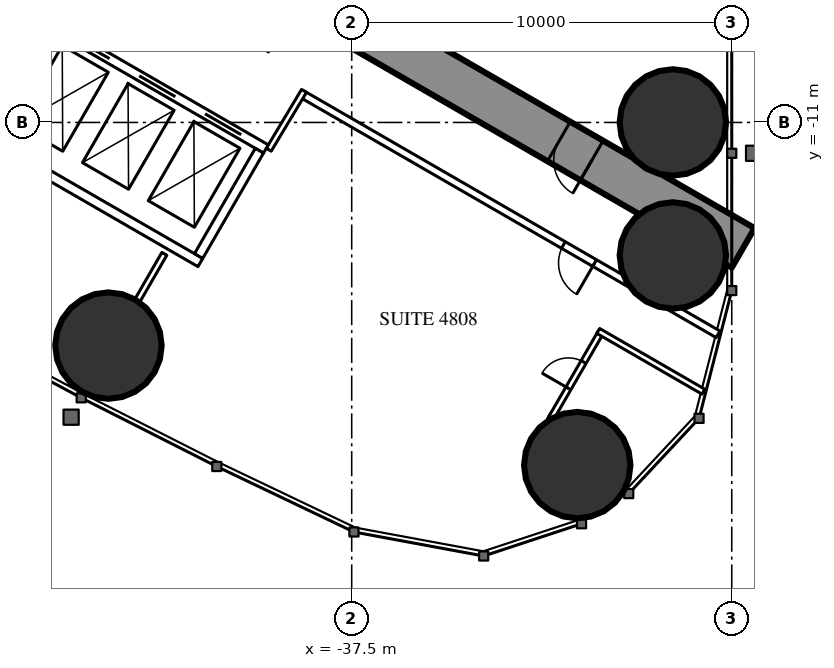
"""IFC4 building model, lengths in metres.
Left out: names, types, materials, properties, quantities, classifications, styles, units other than length and angle.
Written with IfcOpenShell. Run it as: python <this file> out.ifc"""

import sys

from ifc_helpers import new_model, si_unit, direction, frame, frame_2d, origin, origin_2d, place, context, subcontext, project, spatial, rectangle, circle, extrude, element, fill, save


model = new_model("IFC4")
c1 = context("Model", 3, precision=1e-05, world=origin(), true_north=direction((0.0, 1.0)))
c2 = subcontext(c1, "Body", "Model", "MODEL_VIEW")
j1 = project(units=[si_unit("LENGTHUNIT", "METRE"), si_unit("PLANEANGLEUNIT", "RADIAN")], contexts=[c1])
p1 = place(None, origin())
s1 = spatial("IfcSite", under=j1, at=p1, CompositionType="ELEMENT")
p2 = place(p1, origin())
s2 = spatial("IfcBuilding", under=s1, at=p2, CompositionType="ELEMENT")
p3 = place(p2, frame((0.0, 0.0, 180.8)))
s3 = spatial("IfcBuildingStorey", under=s2, at=p3, CompositionType="ELEMENT", Elevation=180.8)
for number, where, z_axis, x_axis in (
    (1, (-31.565, -20.016, 0.0), (0.0, 0.0, 1.0), (1.0, 0.0, 0.0)),
    (2, (-29.05, -11.0, 0.0), (0.0, 0.0, 1.0), (1.0, 0.0, 0.0)),
    (3, (-29.05, -14.5, 0.0), (0.0, 0.0, 1.0), (1.0, 0.0, 0.0)),
    (4, (-43.9, -16.871, 0.0), (0.0, 0.0, 1.0), (1.0, 0.0, 0.0)),
):
    element("IfcColumn", number, at=place(p3, frame(where, z_axis=z_axis, x_axis=x_axis)), inside=s3, PredefinedType="COLUMN", context=c2, shape_type="SweptSolid", body=[
        extrude(circle(Radius=1.4, at=origin_2d()), origin(), (0.0, 0.0, 1.0), 3.5),
    ])
p4 = place(p3, frame((-27.2, -14.3, 0.0), z_axis=(0.0, 0.0, 1.0), x_axis=(-0.866024021859, 0.500002393557, 0.0)))
e5 = element("IfcWall", 5, at=p4, inside=s3, PredefinedType="SHEAR", context=c2, shape_type="SweptSolid", body=[
    extrude(rectangle(XDim=27.907, YDim=1.2, at=frame_2d((13.954, 0.0))), origin(), (0.0, 0.0, 1.0), 3.5),
])
p5 = place(p4, frame((4.6, 0.0, 0.0)))
e6 = element("IfcOpeningElement", 6, at=p5, cuts=e5, PredefinedType="OPENING", context=c2, shape_type="SweptSolid", body=[
    extrude(rectangle(XDim=1.0, YDim=2.2, at=frame_2d((0.5, 1.1))), frame((0.0, 0.61, 0.0), z_axis=(0.0, -1.0, 0.0), x_axis=(1.0, 0.0, 0.0)), (0.0, 0.0, 1.0), 1.22),
])
p6 = place(p4, frame((13.395, 0.0, 0.0)))
e7 = element("IfcOpeningElement", 7, at=p6, cuts=e5, PredefinedType="OPENING", context=c2, shape_type="SweptSolid", body=[
    extrude(rectangle(XDim=1.8, YDim=2.2, at=frame_2d((0.9, 1.1))), frame((0.0, 0.61, 0.0), z_axis=(0.0, -1.0, 0.0), x_axis=(1.0, 0.0, 0.0)), (0.0, 0.0, 1.0), 1.22),
])
p7 = place(p3, frame((-42.429, -14.457, 0.0), z_axis=(0.0, 0.0, 1.0), x_axis=(-0.5000578829, -0.865991982497, 0.0)))
e8 = element("IfcWall", 8, at=p7, inside=s3, PredefinedType="PARTITIONING", context=c2, shape_type="SweptSolid", body=[
    extrude(rectangle(XDim=1.407, YDim=0.15, at=frame_2d((0.704, 0.0))), origin(), (0.0, 0.0, 1.0), 3.25),
])
p8 = place(p3, frame((-27.86, -16.575, 0.0), z_axis=(0.0, 0.0, 1.0), x_axis=(-0.866027756871, 0.499995924312, 0.0)))
e9 = element("IfcWall", 9, at=p8, inside=s3, PredefinedType="PARTITIONING", context=c2, shape_type="SweptSolid", body=[
    extrude(rectangle(XDim=12.622, YDim=0.2, at=frame_2d((6.311, 0.0))), origin(), (0.0, 0.0, 1.0), 3.25),
])
p9 = place(p8, frame((3.75, 0.0, 0.0)))
e10 = element("IfcOpeningElement", 10, at=p9, cuts=e9, PredefinedType="OPENING", context=c2, shape_type="SweptSolid", body=[
    extrude(rectangle(XDim=0.95, YDim=2.2, at=frame_2d((0.475, 1.1))), frame((0.0, 0.11, 0.0), z_axis=(0.0, -1.0, 0.0), x_axis=(1.0, 0.0, 0.0)), (0.0, 0.0, 1.0), 0.22),
])
p10 = place(p3, frame((-39.683, -11.718, 0.0), z_axis=(0.0, 0.0, 1.0), x_axis=(0.514336634837, 0.857588377991, 0.0)))
e11 = element("IfcWall", 11, at=p10, inside=s3, PredefinedType="PARTITIONING", context=c2, shape_type="SweptSolid", body=[
    extrude(rectangle(XDim=1.805, YDim=0.15, at=frame_2d((0.903, 0.0))), origin(), (0.0, 0.0, 1.0), 3.25),
])
p11 = place(p3, frame((-30.17, -19.975, 0.0), z_axis=(0.0, 0.0, 1.0), x_axis=(-0.866006523861, 0.500032699561, 0.0)))
e12 = element("IfcWall", 12, at=p11, inside=s3, PredefinedType="PARTITIONING", context=c2, shape_type="SweptSolid", body=[
    extrude(rectangle(XDim=2.475, YDim=0.15, at=frame_2d((1.237, 0.0))), origin(), (0.0, 0.0, 1.0), 3.25),
])
p12 = place(p3, frame((-30.948, -16.524, 0.0), z_axis=(0.0, 0.0, 1.0), x_axis=(-0.500006934395, -0.866021400173, 0.0)))
e13 = element("IfcWall", 13, at=p12, inside=s3, PredefinedType="PARTITIONING", context=c2, shape_type="SweptSolid", body=[
    extrude(rectangle(XDim=2.6, YDim=0.15, at=frame_2d((1.3, 0.0))), origin(), (0.0, 0.0, 1.0), 2.3),
])
p13 = place(p12, frame((0.9, 0.0, 0.0)))
e14 = element("IfcOpeningElement", 14, at=p13, cuts=e13, PredefinedType="OPENING", context=c2, shape_type="SweptSolid", body=[
    extrude(rectangle(XDim=0.8, YDim=2.2, at=frame_2d((0.4, 1.1))), frame((0.0, 0.085, 0.0), z_axis=(0.0, -1.0, 0.0), x_axis=(1.0, 0.0, 0.0)), (0.0, 0.0, 1.0), 0.17),
])
p14 = place(p3, frame((-28.246, -18.084, 0.0), z_axis=(0.0, 0.0, 1.0), x_axis=(-0.866029063467, 0.49999366119, 0.0)))
e15 = element("IfcWall", 15, at=p14, inside=s3, PredefinedType="PARTITIONING", context=c2, shape_type="SweptSolid", body=[
    extrude(rectangle(XDim=3.195, YDim=0.15, at=frame_2d((1.597, 0.0))), origin(), (0.0, 0.0, 1.0), 3.25),
])
p15 = place(p3, frame((-39.758, -11.697, 0.0), z_axis=(0.0, 0.0, 1.0), x_axis=(-0.866024194504, 0.500002094529, 0.0)))
e16 = element("IfcWall", 16, at=p15, inside=s3, PredefinedType="PARTITIONING", context=c2, shape_type="SweptSolid", body=[
    extrude(rectangle(XDim=6.6, YDim=0.25, at=frame_2d((3.3, 0.0))), origin(), (0.0, 0.0, 1.0), 3.25),
])
p16 = place(p15, frame((0.75, 0.0, 0.0)))
e17 = element("IfcOpeningElement", 17, at=p16, cuts=e16, PredefinedType="OPENING", context=c2, shape_type="SweptSolid", body=[
    extrude(rectangle(XDim=1.1, YDim=2.2, at=frame_2d((0.55, 1.1))), frame((0.0, 0.135, 0.0), z_axis=(0.0, -1.0, 0.0), x_axis=(1.0, 0.0, 0.0)), (0.0, 0.0, 1.0), 0.27),
])
p17 = place(p15, frame((2.75, 0.0, 0.0)))
e18 = element("IfcOpeningElement", 18, at=p17, cuts=e16, PredefinedType="OPENING", context=c2, shape_type="SweptSolid", body=[
    extrude(rectangle(XDim=1.1, YDim=2.2, at=frame_2d((0.55, 1.1))), frame((0.0, 0.135, 0.0), z_axis=(0.0, -1.0, 0.0), x_axis=(1.0, 0.0, 0.0)), (0.0, 0.0, 1.0), 0.27),
])
p18 = place(p15, frame((4.75, 0.0, 0.0)))
e19 = element("IfcOpeningElement", 19, at=p18, cuts=e16, PredefinedType="OPENING", context=c2, shape_type="SweptSolid", body=[
    extrude(rectangle(XDim=1.1, YDim=2.2, at=frame_2d((0.55, 1.1))), frame((0.0, 0.135, 0.0), z_axis=(0.0, -1.0, 0.0), x_axis=(1.0, 0.0, 0.0)), (0.0, 0.0, 1.0), 0.27),
])
p19 = place(p3, frame((-41.482, -14.686, 0.0), z_axis=(0.0, 0.0, 1.0), x_axis=(-0.86603344179, 0.499986077507, 0.0)))
e20 = element("IfcWall", 20, at=p19, inside=s3, PredefinedType="PARTITIONING", context=c2, shape_type="SweptSolid", body=[
    extrude(rectangle(XDim=6.6, YDim=0.25, at=frame_2d((3.3, 0.0))), origin(), (0.0, 0.0, 1.0), 3.25),
])
for number, where, z_axis, x_axis in (
    (21, (-39.928, -11.743, 0.0), (0.0, 0.0, 1.0), (-0.5, -0.866, 0.0)),
    (22, (-45.428, -8.568, 0.0), (0.0, 0.0, 1.0), (-0.5, -0.866, 0.0)),
):
    element("IfcWall", number, at=place(p3, frame(where, z_axis=z_axis, x_axis=x_axis)), inside=s3, PredefinedType="PARTITIONING", context=c2, shape_type="SweptSolid", body=[
        extrude(rectangle(XDim=3.201, YDim=0.25, at=frame_2d((1.6, 0.0))), origin(), (0.0, 0.0, 1.0), 3.25),
    ])
p20 = place(p13, origin())
e23 = element("IfcDoor", 23, at=p20, inside=s3, OperationType="SINGLE_SWING_RIGHT", PredefinedType="DOOR", context=c2, shape_type="SweptSolid", body=[
    extrude(rectangle(XDim=0.8, YDim=2.2, at=frame_2d((0.4, 1.1))), frame((0.0, 0.025, 0.0), z_axis=(0.0, -1.0, 0.0), x_axis=(1.0, 0.0, 0.0)), (0.0, 0.0, 1.0), 0.05),
])
fill(e14, e23)
p21 = place(p9, origin())
e24 = element("IfcDoor", 24, at=p21, inside=s3, OperationType="SINGLE_SWING_LEFT", PredefinedType="DOOR", context=c2, shape_type="SweptSolid", body=[
    extrude(rectangle(XDim=0.95, YDim=2.2, at=frame_2d((0.475, 1.1))), frame((0.0, 0.025, 0.0), z_axis=(0.0, -1.0, 0.0), x_axis=(1.0, 0.0, 0.0)), (0.0, 0.0, 1.0), 0.05),
])
fill(e10, e24)
p22 = place(p5, origin())
e25 = element("IfcDoor", 25, at=p22, inside=s3, OperationType="SINGLE_SWING_LEFT", PredefinedType="DOOR", context=c2, shape_type="SweptSolid", body=[
    extrude(rectangle(XDim=1.0, YDim=2.2, at=frame_2d((0.5, 1.1))), frame((0.0, 0.025, 0.0), z_axis=(0.0, -1.0, 0.0), x_axis=(1.0, 0.0, 0.0)), (0.0, 0.0, 1.0), 0.05),
])
fill(e6, e25)
p23 = place(p16, origin())
e26 = element("IfcDoor", 26, at=p23, inside=s3, OperationType="DOUBLE_DOOR_SLIDING", PredefinedType="USERDEFINED", context=c2, shape_type="SweptSolid", body=[
    extrude(rectangle(XDim=1.1, YDim=2.2, at=frame_2d((0.55, 1.1))), frame((0.0, 0.025, 0.0), z_axis=(0.0, -1.0, 0.0), x_axis=(1.0, 0.0, 0.0)), (0.0, 0.0, 1.0), 0.05),
])
fill(e17, e26)
p24 = place(p17, origin())
e27 = element("IfcDoor", 27, at=p24, inside=s3, OperationType="DOUBLE_DOOR_SLIDING", PredefinedType="USERDEFINED", context=c2, shape_type="SweptSolid", body=[
    extrude(rectangle(XDim=1.1, YDim=2.2, at=frame_2d((0.55, 1.1))), frame((0.0, 0.025, 0.0), z_axis=(0.0, -1.0, 0.0), x_axis=(1.0, 0.0, 0.0)), (0.0, 0.0, 1.0), 0.05),
])
fill(e18, e27)
p25 = place(p18, origin())
e28 = element("IfcDoor", 28, at=p25, inside=s3, OperationType="DOUBLE_DOOR_SLIDING", PredefinedType="USERDEFINED", context=c2, shape_type="SweptSolid", body=[
    extrude(rectangle(XDim=1.1, YDim=2.2, at=frame_2d((0.55, 1.1))), frame((0.0, 0.025, 0.0), z_axis=(0.0, -1.0, 0.0), x_axis=(1.0, 0.0, 0.0)), (0.0, 0.0, 1.0), 0.05),
])
fill(e19, e28)
save(model, sys.argv[1])
